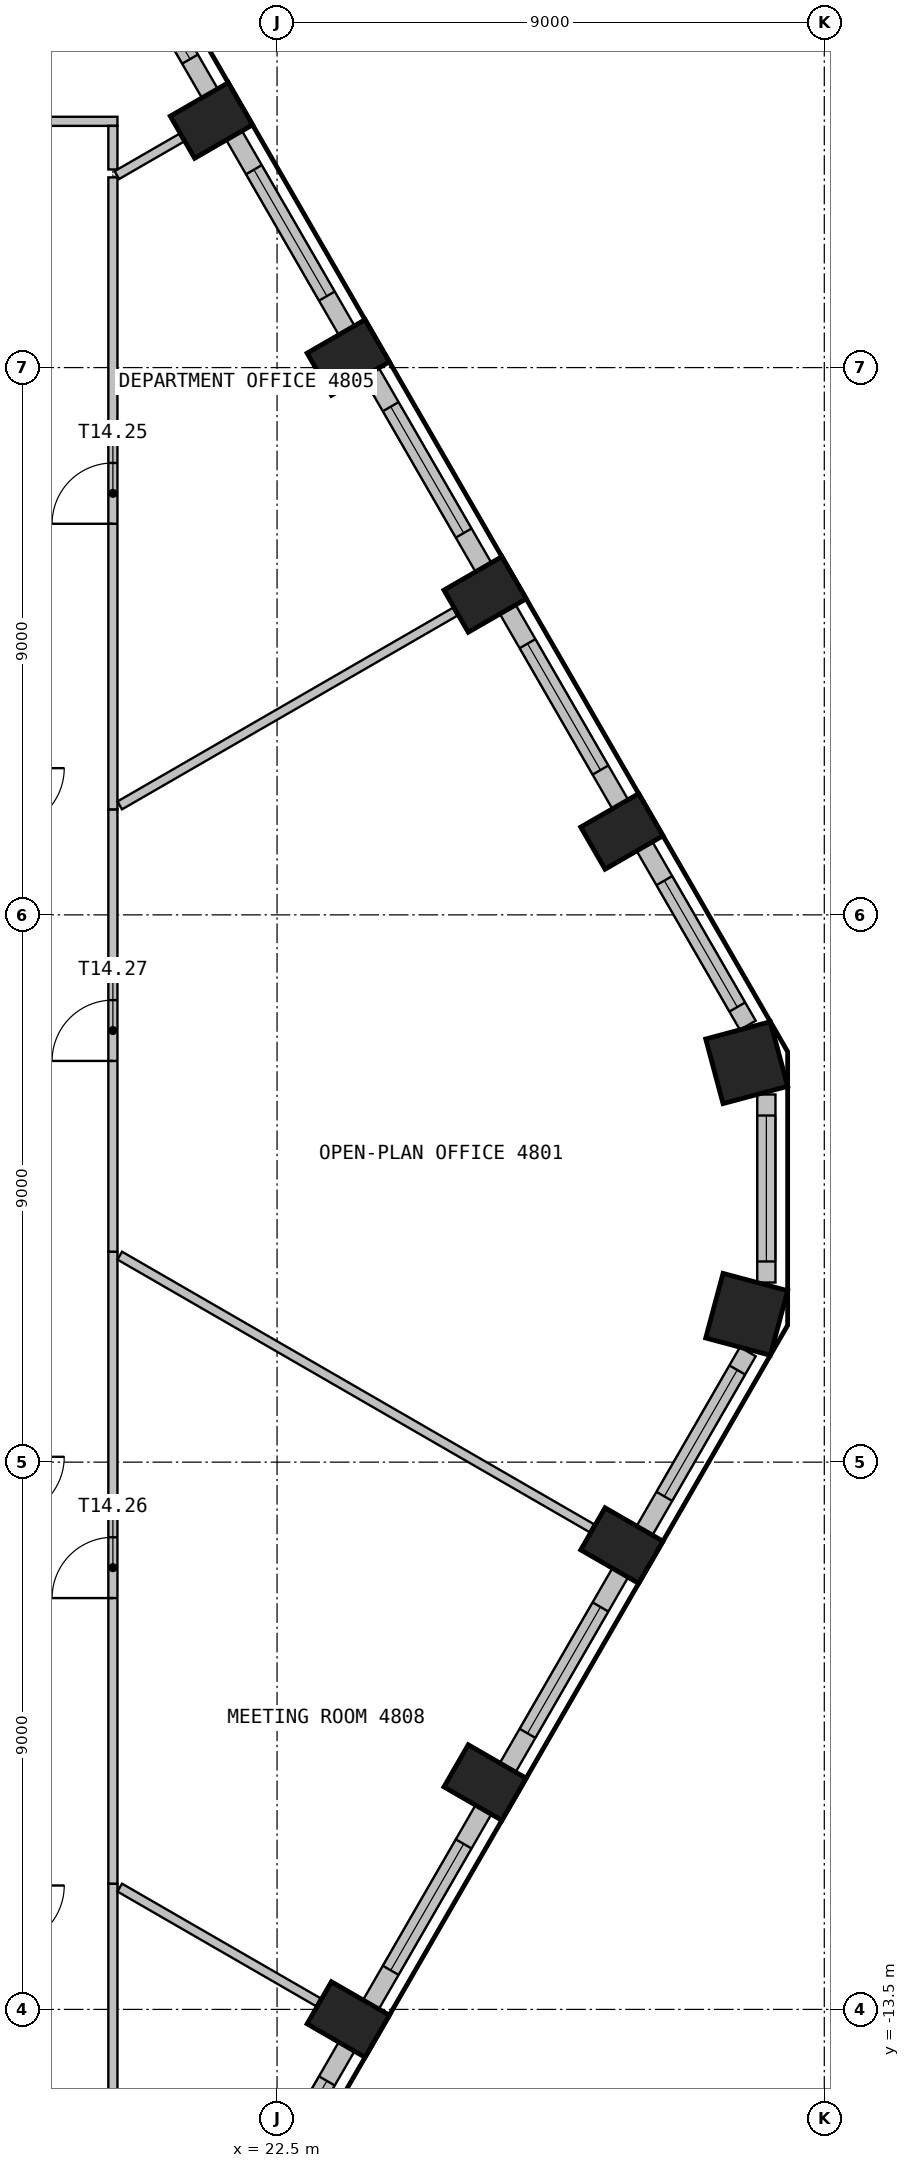
"""IFC4 building model, lengths in metres.
Left out: names, types, materials, properties, quantities, classifications, styles, units other than length and angle.
Written with IfcOpenShell. Run it as: python <this file> out.ifc"""

import sys

from ifc_helpers import new_model, si_unit, direction, frame, frame_2d, origin, origin_2d, place, context, subcontext, project, spatial, rectangle, extrude, element, fill, save


model = new_model("IFC4")
c1 = context("Model", 3, precision=1e-05, world=origin(), true_north=direction((0.0, 1.0)))
c2 = subcontext(c1, "Body", "Model", "MODEL_VIEW")
j1 = project(units=[si_unit("LENGTHUNIT", "METRE"), si_unit("PLANEANGLEUNIT", "RADIAN")], contexts=[c1])
p1 = place(None, origin())
s1 = spatial("IfcSite", under=j1, at=p1, CompositionType="ELEMENT")
p2 = place(p1, origin())
s2 = spatial("IfcBuilding", under=s1, at=p2, CompositionType="ELEMENT")
p3 = place(p2, frame((0.0, 0.0, 195.6)))
s3 = spatial("IfcBuildingStorey", under=s2, at=p3, CompositionType="ELEMENT", Elevation=195.6)
for number, where, z_axis, x_axis in (
    (1, (23.671, -13.666, 0.0), (0.0, 0.0, 1.0), (0.5, 0.866, 0.0)),
    (2, (25.921, -9.769, 0.0), (0.0, 0.0, 1.0), (0.5, 0.866, 0.0)),
    (3, (28.171, -5.872, 0.0), (0.0, 0.0, 1.0), (0.5, 0.866, 0.0)),
):
    element("IfcColumn", number, at=place(p3, frame(where, z_axis=z_axis, x_axis=x_axis)), inside=s3, PredefinedType="COLUMN", context=c2, shape_type="SweptSolid", body=[
        extrude(rectangle(XDim=0.8, YDim=1.1, at=origin_2d()), origin(), (0.0, 0.0, 1.0), 3.55),
    ])
for number, where, z_axis, x_axis in (
    (4, (30.223, -2.07, 0.0), (0.0, 0.0, 1.0), (0.259, 0.966, 0.0)),
    (5, (30.223, 2.07, 0.0), (0.0, 0.0, 1.0), (-0.259, 0.966, 0.0)),
):
    element("IfcColumn", number, at=place(p3, frame(where, z_axis=z_axis, x_axis=x_axis)), inside=s3, PredefinedType="COLUMN", context=c2, shape_type="SweptSolid", body=[
        extrude(rectangle(XDim=1.1, YDim=1.1, at=origin_2d()), origin(), (0.0, 0.0, 1.0), 3.55),
    ])
for number, where, z_axis, x_axis in (
    (6, (28.171, 5.872, 0.0), (0.0, 0.0, 1.0), (-0.5, 0.866, 0.0)),
    (7, (25.921, 9.769, 0.0), (0.0, 0.0, 1.0), (-0.5, 0.866, 0.0)),
    (8, (23.671, 13.666, 0.0), (0.0, 0.0, 1.0), (-0.5, 0.866, 0.0)),
    (9, (21.421, 17.563, 0.0), (0.0, 0.0, 1.0), (-0.5, 0.866, 0.0)),
):
    element("IfcColumn", number, at=place(p3, frame(where, z_axis=z_axis, x_axis=x_axis)), inside=s3, PredefinedType="COLUMN", context=c2, shape_type="SweptSolid", body=[
        extrude(rectangle(XDim=0.8, YDim=1.1, at=origin_2d()), origin(), (0.0, 0.0, 1.0), 3.55),
    ])
p4 = place(p3, frame((21.794, -17.317, 0.0), z_axis=(0.0, 0.0, 1.0), x_axis=(0.500029062817, 0.866008623709, 0.0)))
e10 = element("IfcWall", 10, at=p4, inside=s3, PredefinedType="SOLIDWALL", context=c2, shape_type="SweptSolid", body=[
    extrude(rectangle(XDim=3.699, YDim=0.3, at=frame_2d((1.85, 0.0))), origin(), (0.0, 0.0, 1.0), 3.55),
])
p5 = place(p4, frame((0.649, 0.0, 0.9)))
e11 = element("IfcOpeningElement", 11, at=p5, cuts=e10, PredefinedType="OPENING", context=c2, shape_type="SweptSolid", body=[
    extrude(rectangle(XDim=2.4, YDim=2.1, at=frame_2d((1.2, 1.05))), frame((0.0, 0.16, 0.0), z_axis=(0.0, -1.0, 0.0), x_axis=(1.0, 0.0, 0.0)), (0.0, 0.0, 1.0), 0.32),
])
p6 = place(p3, frame((24.044, -13.419, 0.0), z_axis=(0.0, 0.0, 1.0), x_axis=(0.500029062817, 0.866008623709, 0.0)))
e12 = element("IfcWall", 12, at=p6, inside=s3, PredefinedType="SOLIDWALL", context=c2, shape_type="SweptSolid", body=[
    extrude(rectangle(XDim=3.699, YDim=0.3, at=frame_2d((1.85, 0.0))), origin(), (0.0, 0.0, 1.0), 3.55),
])
p7 = place(p6, frame((0.649, 0.0, 0.9)))
e13 = element("IfcOpeningElement", 13, at=p7, cuts=e12, PredefinedType="OPENING", context=c2, shape_type="SweptSolid", body=[
    extrude(rectangle(XDim=2.4, YDim=2.1, at=frame_2d((1.2, 1.05))), frame((0.0, 0.16, 0.0), z_axis=(0.0, -1.0, 0.0), x_axis=(1.0, 0.0, 0.0)), (0.0, 0.0, 1.0), 0.32),
])
p8 = place(p3, frame((26.294, -9.522, 0.0), z_axis=(0.0, 0.0, 1.0), x_axis=(0.500029062817, 0.866008623709, 0.0)))
e14 = element("IfcWall", 14, at=p8, inside=s3, PredefinedType="SOLIDWALL", context=c2, shape_type="SweptSolid", body=[
    extrude(rectangle(XDim=3.699, YDim=0.3, at=frame_2d((1.85, 0.0))), origin(), (0.0, 0.0, 1.0), 3.55),
])
p9 = place(p8, frame((0.649, 0.0, 0.9)))
e15 = element("IfcOpeningElement", 15, at=p9, cuts=e14, PredefinedType="OPENING", context=c2, shape_type="SweptSolid", body=[
    extrude(rectangle(XDim=2.4, YDim=2.1, at=frame_2d((1.2, 1.05))), frame((0.0, 0.16, 0.0), z_axis=(0.0, -1.0, 0.0), x_axis=(1.0, 0.0, 0.0)), (0.0, 0.0, 1.0), 0.32),
])
p10 = place(p3, frame((28.544, -5.625, 0.0), z_axis=(0.0, 0.0, 1.0), x_axis=(0.500012868213, 0.866017974191, 0.0)))
e16 = element("IfcWall", 16, at=p10, inside=s3, PredefinedType="SOLIDWALL", context=c2, shape_type="SweptSolid", body=[
    extrude(rectangle(XDim=3.396, YDim=0.3, at=frame_2d((1.698, 0.0))), origin(), (0.0, 0.0, 1.0), 3.55),
])
p11 = place(p10, frame((0.649, 0.0, 0.9)))
e17 = element("IfcOpeningElement", 17, at=p11, cuts=e16, PredefinedType="OPENING", context=c2, shape_type="SweptSolid", body=[
    extrude(rectangle(XDim=2.4, YDim=2.1, at=frame_2d((1.2, 1.05))), frame((0.0, 0.16, 0.0), z_axis=(0.0, -1.0, 0.0), x_axis=(1.0, 0.0, 0.0)), (0.0, 0.0, 1.0), 0.32),
])
p12 = place(p3, frame((30.547, -1.546, 0.0), z_axis=(0.0, 0.0, 1.0), x_axis=(0.0, 1.0, 0.0)))
e18 = element("IfcWall", 18, at=p12, inside=s3, PredefinedType="SOLIDWALL", context=c2, shape_type="SweptSolid", body=[
    extrude(rectangle(XDim=3.093, YDim=0.3, at=frame_2d((1.546, 0.0))), origin(), (0.0, 0.0, 1.0), 3.55),
])
p13 = place(p12, frame((0.346, 0.0, 0.9)))
e19 = element("IfcOpeningElement", 19, at=p13, cuts=e18, PredefinedType="OPENING", context=c2, shape_type="SweptSolid", body=[
    extrude(rectangle(XDim=2.4, YDim=2.1, at=frame_2d((1.2, 1.05))), frame((0.0, 0.16, 0.0), z_axis=(0.0, -1.0, 0.0), x_axis=(1.0, 0.0, 0.0)), (0.0, 0.0, 1.0), 0.32),
])
p14 = place(p3, frame((30.242, 2.684, 0.0), z_axis=(0.0, 0.0, 1.0), x_axis=(-0.500012868213, 0.866017974191, 0.0)))
e20 = element("IfcWall", 20, at=p14, inside=s3, PredefinedType="SOLIDWALL", context=c2, shape_type="SweptSolid", body=[
    extrude(rectangle(XDim=3.396, YDim=0.3, at=frame_2d((1.698, 0.0))), origin(), (0.0, 0.0, 1.0), 3.55),
])
p15 = place(p14, frame((0.346, 0.0, 0.9)))
e21 = element("IfcOpeningElement", 21, at=p15, cuts=e20, PredefinedType="OPENING", context=c2, shape_type="SweptSolid", body=[
    extrude(rectangle(XDim=2.4, YDim=2.1, at=frame_2d((1.2, 1.05))), frame((0.0, 0.16, 0.0), z_axis=(0.0, -1.0, 0.0), x_axis=(1.0, 0.0, 0.0)), (0.0, 0.0, 1.0), 0.32),
])
p16 = place(p3, frame((28.144, 6.319, 0.0), z_axis=(0.0, 0.0, 1.0), x_axis=(-0.500029062817, 0.866008623709, 0.0)))
e22 = element("IfcWall", 22, at=p16, inside=s3, PredefinedType="SOLIDWALL", context=c2, shape_type="SweptSolid", body=[
    extrude(rectangle(XDim=3.699, YDim=0.3, at=frame_2d((1.85, 0.0))), origin(), (0.0, 0.0, 1.0), 3.55),
])
p17 = place(p16, frame((0.649, 0.0, 0.9)))
e23 = element("IfcOpeningElement", 23, at=p17, cuts=e22, PredefinedType="OPENING", context=c2, shape_type="SweptSolid", body=[
    extrude(rectangle(XDim=2.4, YDim=2.1, at=frame_2d((1.2, 1.05))), frame((0.0, 0.16, 0.0), z_axis=(0.0, -1.0, 0.0), x_axis=(1.0, 0.0, 0.0)), (0.0, 0.0, 1.0), 0.32),
])
p18 = place(p3, frame((25.894, 10.216, 0.0), z_axis=(0.0, 0.0, 1.0), x_axis=(-0.500029062817, 0.866008623709, 0.0)))
e24 = element("IfcWall", 24, at=p18, inside=s3, PredefinedType="SOLIDWALL", context=c2, shape_type="SweptSolid", body=[
    extrude(rectangle(XDim=3.699, YDim=0.3, at=frame_2d((1.85, 0.0))), origin(), (0.0, 0.0, 1.0), 3.55),
])
p19 = place(p18, frame((0.649, 0.0, 0.9)))
e25 = element("IfcOpeningElement", 25, at=p19, cuts=e24, PredefinedType="OPENING", context=c2, shape_type="SweptSolid", body=[
    extrude(rectangle(XDim=2.4, YDim=2.1, at=frame_2d((1.2, 1.05))), frame((0.0, 0.16, 0.0), z_axis=(0.0, -1.0, 0.0), x_axis=(1.0, 0.0, 0.0)), (0.0, 0.0, 1.0), 0.32),
])
p20 = place(p3, frame((23.644, 14.113, 0.0), z_axis=(0.0, 0.0, 1.0), x_axis=(-0.500029062817, 0.866008623709, 0.0)))
e26 = element("IfcWall", 26, at=p20, inside=s3, PredefinedType="SOLIDWALL", context=c2, shape_type="SweptSolid", body=[
    extrude(rectangle(XDim=3.699, YDim=0.3, at=frame_2d((1.85, 0.0))), origin(), (0.0, 0.0, 1.0), 3.55),
])
p21 = place(p20, frame((0.649, 0.0, 0.9)))
e27 = element("IfcOpeningElement", 27, at=p21, cuts=e26, PredefinedType="OPENING", context=c2, shape_type="SweptSolid", body=[
    extrude(rectangle(XDim=2.4, YDim=2.1, at=frame_2d((1.2, 1.05))), frame((0.0, 0.16, 0.0), z_axis=(0.0, -1.0, 0.0), x_axis=(1.0, 0.0, 0.0)), (0.0, 0.0, 1.0), 0.32),
])
p22 = place(p3, frame((21.394, 18.01, 0.0), z_axis=(0.0, 0.0, 1.0), x_axis=(-0.500012868213, 0.866017974191, 0.0)))
e28 = element("IfcWall", 28, at=p22, inside=s3, PredefinedType="SOLIDWALL", context=c2, shape_type="SweptSolid", body=[
    extrude(rectangle(XDim=3.396, YDim=0.3, at=frame_2d((1.698, 0.0))), origin(), (0.0, 0.0, 1.0), 3.55),
])
p23 = place(p22, frame((0.649, 0.0, 0.9)))
e29 = element("IfcOpeningElement", 29, at=p23, cuts=e28, PredefinedType="OPENING", context=c2, shape_type="SweptSolid", body=[
    extrude(rectangle(XDim=2.4, YDim=2.1, at=frame_2d((1.2, 1.05))), frame((0.0, 0.16, 0.0), z_axis=(0.0, -1.0, 0.0), x_axis=(1.0, 0.0, 0.0)), (0.0, 0.0, 1.0), 0.32),
])
p24 = place(p3, frame((19.875, 17.55, 0.0), z_axis=(0.0, 0.0, 1.0), x_axis=(-1.0, 0.0, 0.0)))
e30 = element("IfcWall", 30, at=p24, inside=s3, PredefinedType="PARTITIONING", context=c2, shape_type="SweptSolid", body=[
    extrude(rectangle(XDim=8.625, YDim=0.15, at=frame_2d((4.312, 0.0))), origin(), (0.0, 0.0, 1.0), 3.55),
])
p25 = place(p24, frame((3.812, 0.0, 0.0)))
e31 = element("IfcOpeningElement", 31, at=p25, cuts=e30, PredefinedType="OPENING", context=c2, shape_type="SweptSolid", body=[
    extrude(rectangle(XDim=1.0, YDim=2.1, at=frame_2d((0.5, 1.05))), frame((0.0, 0.085, 0.0), z_axis=(0.0, -1.0, 0.0), x_axis=(1.0, 0.0, 0.0)), (0.0, 0.0, 1.0), 0.17),
])
p26 = place(p3, frame((19.8, -17.475, 0.0), z_axis=(0.0, 0.0, 1.0), x_axis=(0.0, 1.0, 0.0)))
e32 = element("IfcWall", 32, at=p26, inside=s3, PredefinedType="PARTITIONING", context=c2, shape_type="SweptSolid", body=[
    extrude(rectangle(XDim=6.043, YDim=0.15, at=frame_2d((3.021, 0.0))), origin(), (0.0, 0.0, 1.0), 3.55),
])
p27 = place(p3, frame((19.8, -11.432, 0.0), z_axis=(0.0, 0.0, 1.0), x_axis=(0.0, 1.0, 0.0)))
e33 = element("IfcWall", 33, at=p27, inside=s3, PredefinedType="PARTITIONING", context=c2, shape_type="SweptSolid", body=[
    extrude(rectangle(XDim=10.393, YDim=0.15, at=frame_2d((5.196, 0.0))), origin(), (0.0, 0.0, 1.0), 3.55),
])
p28 = place(p27, frame((4.697, 0.0, 0.0)))
e34 = element("IfcOpeningElement", 34, at=p28, cuts=e33, PredefinedType="OPENING", context=c2, shape_type="SweptSolid", body=[
    extrude(rectangle(XDim=1.0, YDim=2.1, at=frame_2d((0.5, 1.05))), frame((0.0, 0.085, 0.0), z_axis=(0.0, -1.0, 0.0), x_axis=(1.0, 0.0, 0.0)), (0.0, 0.0, 1.0), 0.17),
])
p29 = place(p3, frame((19.913, -11.497, 0.0), z_axis=(0.0, 0.0, 1.0), x_axis=(0.866090681374, -0.499886918849, 0.0)))
e35 = element("IfcWall", 35, at=p29, inside=s3, PredefinedType="PARTITIONING", context=c2, shape_type="SweptSolid", body=[
    extrude(rectangle(XDim=3.769, YDim=0.15, at=frame_2d((1.885, 0.0))), origin(), (0.0, 0.0, 1.0), 3.55),
])
p30 = place(p3, frame((19.8, -1.039, 0.0), z_axis=(0.0, 0.0, 1.0), x_axis=(0.0, 1.0, 0.0)))
e36 = element("IfcWall", 36, at=p30, inside=s3, PredefinedType="PARTITIONING", context=c2, shape_type="SweptSolid", body=[
    extrude(rectangle(XDim=7.274, YDim=0.15, at=frame_2d((3.637, 0.0))), origin(), (0.0, 0.0, 1.0), 3.55),
])
p31 = place(p30, frame((3.137, 0.0, 0.0)))
e37 = element("IfcOpeningElement", 37, at=p31, cuts=e36, PredefinedType="OPENING", context=c2, shape_type="SweptSolid", body=[
    extrude(rectangle(XDim=1.0, YDim=2.1, at=frame_2d((0.5, 1.05))), frame((0.0, 0.085, 0.0), z_axis=(0.0, -1.0, 0.0), x_axis=(1.0, 0.0, 0.0)), (0.0, 0.0, 1.0), 0.17),
])
p32 = place(p3, frame((19.913, -1.104, 0.0), z_axis=(0.0, 0.0, 1.0), x_axis=(0.866007370051, -0.500031234042, 0.0)))
e38 = element("IfcWall", 38, at=p32, inside=s3, PredefinedType="PARTITIONING", context=c2, shape_type="SweptSolid", body=[
    extrude(rectangle(XDim=8.966, YDim=0.15, at=frame_2d((4.483, 0.0))), origin(), (0.0, 0.0, 1.0), 3.55),
])
p33 = place(p3, frame((19.8, 6.235, 0.0), z_axis=(0.0, 0.0, 1.0), x_axis=(0.0, 1.0, 0.0)))
e39 = element("IfcWall", 39, at=p33, inside=s3, PredefinedType="PARTITIONING", context=c2, shape_type="SweptSolid", body=[
    extrude(rectangle(XDim=10.393, YDim=0.15, at=frame_2d((5.196, 0.0))), origin(), (0.0, 0.0, 1.0), 3.55),
])
p34 = place(p33, frame((4.697, 0.0, 0.0)))
e40 = element("IfcOpeningElement", 40, at=p34, cuts=e39, PredefinedType="OPENING", context=c2, shape_type="SweptSolid", body=[
    extrude(rectangle(XDim=1.0, YDim=2.1, at=frame_2d((0.5, 1.05))), frame((0.0, 0.085, 0.0), z_axis=(0.0, -1.0, 0.0), x_axis=(1.0, 0.0, 0.0)), (0.0, 0.0, 1.0), 0.17),
])
p35 = place(p3, frame((25.427, 9.484, 0.0), z_axis=(0.0, 0.0, 1.0), x_axis=(-0.866011921086, -0.500023351992, 0.0)))
e41 = element("IfcWall", 41, at=p35, inside=s3, PredefinedType="PARTITIONING", context=c2, shape_type="SweptSolid", body=[
    extrude(rectangle(XDim=6.368, YDim=0.15, at=frame_2d((3.184, 0.0))), origin(), (0.0, 0.0, 1.0), 3.55),
])
p36 = place(p3, frame((19.8, 16.758, 0.0), z_axis=(0.0, 0.0, 1.0), x_axis=(0.0, 1.0, 0.0)))
e42 = element("IfcWall", 42, at=p36, inside=s3, PredefinedType="PARTITIONING", context=c2, shape_type="SweptSolid", body=[
    extrude(rectangle(XDim=0.717, YDim=0.15, at=frame_2d((0.358, 0.0))), origin(), (0.0, 0.0, 1.0), 3.55),
])
p37 = place(p3, frame((20.927, 17.278, 0.0), z_axis=(0.0, 0.0, 1.0), x_axis=(-0.866202157257, -0.499693728962, 0.0)))
e43 = element("IfcWall", 43, at=p37, inside=s3, PredefinedType="PARTITIONING", context=c2, shape_type="SweptSolid", body=[
    extrude(rectangle(XDim=1.226, YDim=0.15, at=frame_2d((0.613, 0.0))), origin(), (0.0, 0.0, 1.0), 3.55),
])
p38 = place(p5, origin())
e44 = element("IfcWindow", 44, at=p38, inside=s3, PartitioningType="SINGLE_PANEL", PredefinedType="WINDOW", context=c2, shape_type="SweptSolid", body=[
    extrude(rectangle(XDim=2.4, YDim=2.1, at=frame_2d((1.2, 1.05))), frame((0.0, 0.03, 0.0), z_axis=(0.0, -1.0, 0.0), x_axis=(1.0, 0.0, 0.0)), (0.0, 0.0, 1.0), 0.06),
])
fill(e11, e44)
p39 = place(p7, origin())
e45 = element("IfcWindow", 45, at=p39, inside=s3, PartitioningType="SINGLE_PANEL", PredefinedType="WINDOW", context=c2, shape_type="SweptSolid", body=[
    extrude(rectangle(XDim=2.4, YDim=2.1, at=frame_2d((1.2, 1.05))), frame((0.0, 0.03, 0.0), z_axis=(0.0, -1.0, 0.0), x_axis=(1.0, 0.0, 0.0)), (0.0, 0.0, 1.0), 0.06),
])
fill(e13, e45)
p40 = place(p9, origin())
e46 = element("IfcWindow", 46, at=p40, inside=s3, PartitioningType="SINGLE_PANEL", PredefinedType="WINDOW", context=c2, shape_type="SweptSolid", body=[
    extrude(rectangle(XDim=2.4, YDim=2.1, at=frame_2d((1.2, 1.05))), frame((0.0, 0.03, 0.0), z_axis=(0.0, -1.0, 0.0), x_axis=(1.0, 0.0, 0.0)), (0.0, 0.0, 1.0), 0.06),
])
fill(e15, e46)
p41 = place(p11, origin())
e47 = element("IfcWindow", 47, at=p41, inside=s3, PartitioningType="SINGLE_PANEL", PredefinedType="WINDOW", context=c2, shape_type="SweptSolid", body=[
    extrude(rectangle(XDim=2.4, YDim=2.1, at=frame_2d((1.2, 1.05))), frame((0.0, 0.03, 0.0), z_axis=(0.0, -1.0, 0.0), x_axis=(1.0, 0.0, 0.0)), (0.0, 0.0, 1.0), 0.06),
])
fill(e17, e47)
p42 = place(p13, origin())
e48 = element("IfcWindow", 48, at=p42, inside=s3, PartitioningType="SINGLE_PANEL", PredefinedType="WINDOW", context=c2, shape_type="SweptSolid", body=[
    extrude(rectangle(XDim=2.4, YDim=2.1, at=frame_2d((1.2, 1.05))), frame((0.0, 0.03, 0.0), z_axis=(0.0, -1.0, 0.0), x_axis=(1.0, 0.0, 0.0)), (0.0, 0.0, 1.0), 0.06),
])
fill(e19, e48)
p43 = place(p15, origin())
e49 = element("IfcWindow", 49, at=p43, inside=s3, PartitioningType="SINGLE_PANEL", PredefinedType="WINDOW", context=c2, shape_type="SweptSolid", body=[
    extrude(rectangle(XDim=2.4, YDim=2.1, at=frame_2d((1.2, 1.05))), frame((0.0, 0.03, 0.0), z_axis=(0.0, -1.0, 0.0), x_axis=(1.0, 0.0, 0.0)), (0.0, 0.0, 1.0), 0.06),
])
fill(e21, e49)
p44 = place(p17, origin())
e50 = element("IfcWindow", 50, at=p44, inside=s3, PartitioningType="SINGLE_PANEL", PredefinedType="WINDOW", context=c2, shape_type="SweptSolid", body=[
    extrude(rectangle(XDim=2.4, YDim=2.1, at=frame_2d((1.2, 1.05))), frame((0.0, 0.03, 0.0), z_axis=(0.0, -1.0, 0.0), x_axis=(1.0, 0.0, 0.0)), (0.0, 0.0, 1.0), 0.06),
])
fill(e23, e50)
p45 = place(p19, origin())
e51 = element("IfcWindow", 51, at=p45, inside=s3, PartitioningType="SINGLE_PANEL", PredefinedType="WINDOW", context=c2, shape_type="SweptSolid", body=[
    extrude(rectangle(XDim=2.4, YDim=2.1, at=frame_2d((1.2, 1.05))), frame((0.0, 0.03, 0.0), z_axis=(0.0, -1.0, 0.0), x_axis=(1.0, 0.0, 0.0)), (0.0, 0.0, 1.0), 0.06),
])
fill(e25, e51)
p46 = place(p21, origin())
e52 = element("IfcWindow", 52, at=p46, inside=s3, PartitioningType="SINGLE_PANEL", PredefinedType="WINDOW", context=c2, shape_type="SweptSolid", body=[
    extrude(rectangle(XDim=2.4, YDim=2.1, at=frame_2d((1.2, 1.05))), frame((0.0, 0.03, 0.0), z_axis=(0.0, -1.0, 0.0), x_axis=(1.0, 0.0, 0.0)), (0.0, 0.0, 1.0), 0.06),
])
fill(e27, e52)
p47 = place(p23, origin())
e53 = element("IfcWindow", 53, at=p47, inside=s3, PartitioningType="SINGLE_PANEL", PredefinedType="WINDOW", context=c2, shape_type="SweptSolid", body=[
    extrude(rectangle(XDim=2.4, YDim=2.1, at=frame_2d((1.2, 1.05))), frame((0.0, 0.03, 0.0), z_axis=(0.0, -1.0, 0.0), x_axis=(1.0, 0.0, 0.0)), (0.0, 0.0, 1.0), 0.06),
])
fill(e29, e53)
p48 = place(p34, origin())
e54 = element("IfcDoor", 54, at=p48, inside=s3, OperationType="SINGLE_SWING_LEFT", PredefinedType="DOOR", context=c2, shape_type="SweptSolid", body=[
    extrude(rectangle(XDim=1.0, YDim=2.1, at=frame_2d((0.5, 1.05))), frame((0.0, 0.025, 0.0), z_axis=(0.0, -1.0, 0.0), x_axis=(1.0, 0.0, 0.0)), (0.0, 0.0, 1.0), 0.05),
])
fill(e40, e54)
p49 = place(p28, origin())
e55 = element("IfcDoor", 55, at=p49, inside=s3, OperationType="SINGLE_SWING_RIGHT", PredefinedType="DOOR", context=c2, shape_type="SweptSolid", body=[
    extrude(rectangle(XDim=1.0, YDim=2.1, at=frame_2d((0.5, 1.05))), frame((0.0, 0.025, 0.0), z_axis=(0.0, -1.0, 0.0), x_axis=(1.0, 0.0, 0.0)), (0.0, 0.0, 1.0), 0.05),
])
fill(e34, e55)
p50 = place(p31, origin())
e56 = element("IfcDoor", 56, at=p50, inside=s3, OperationType="SINGLE_SWING_RIGHT", PredefinedType="DOOR", context=c2, shape_type="SweptSolid", body=[
    extrude(rectangle(XDim=1.0, YDim=2.1, at=frame_2d((0.5, 1.05))), frame((0.0, 0.025, 0.0), z_axis=(0.0, -1.0, 0.0), x_axis=(1.0, 0.0, 0.0)), (0.0, 0.0, 1.0), 0.05),
])
fill(e37, e56)
save(model, sys.argv[1])
